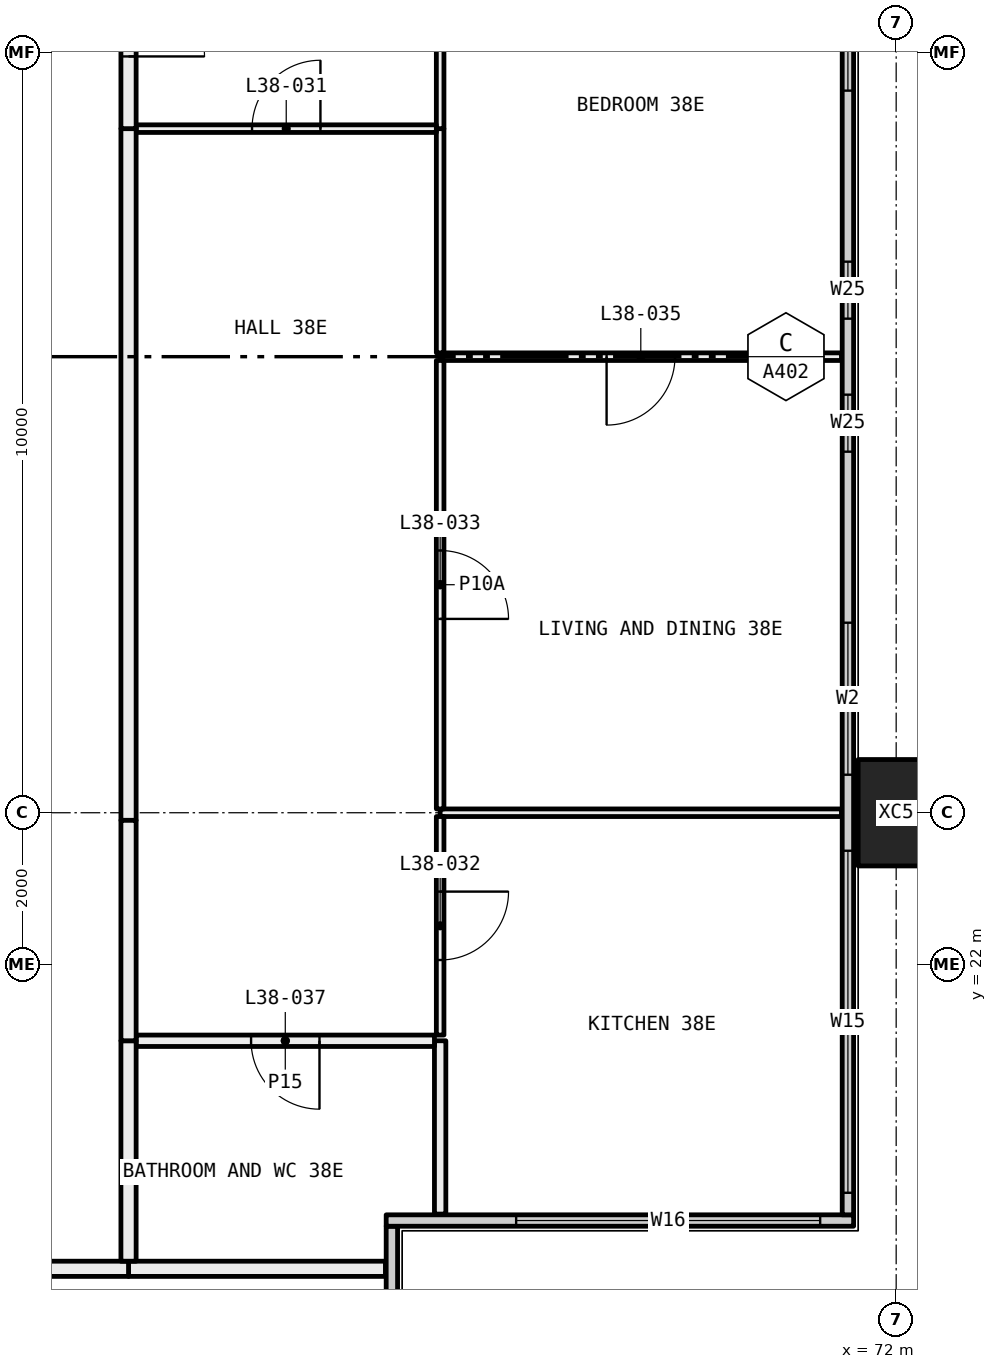
"""IFC4 building model, lengths in metres.
Left out: names, types, materials, properties, quantities, classifications, styles, units other than length and angle.
Written with IfcOpenShell. Run it as: python <this file> out.ifc"""

import sys

from ifc_helpers import new_model, si_unit, direction, frame, frame_2d, origin, origin_2d, place, context, subcontext, project, spatial, rectangle, hollow_rectangle, extrude, element, fill, save


model = new_model("IFC4")
c1 = context("Model", 3, precision=1e-05, world=origin(), true_north=direction((0.0, 1.0)))
c2 = subcontext(c1, "Body", "Model", "MODEL_VIEW")
j1 = project(units=[si_unit("LENGTHUNIT", "METRE"), si_unit("PLANEANGLEUNIT", "RADIAN")], contexts=[c1])
p1 = place(None, origin())
s1 = spatial("IfcSite", under=j1, at=p1, CompositionType="ELEMENT")
p2 = place(p1, origin())
s2 = spatial("IfcBuilding", under=s1, at=p2, CompositionType="ELEMENT")
p3 = place(p2, frame((0.0, 0.0, 144.9)))
s3 = spatial("IfcBuildingStorey", under=s2, at=p3, CompositionType="ELEMENT", Elevation=144.9)
p4 = place(p3, frame((72.0, 24.0, -0.4), z_axis=(0.0, 0.0, 1.0), x_axis=(0.0, 1.0, 0.0)))
e1 = element("IfcColumn", 1, at=p4, inside=s3, PredefinedType="COLUMN", context=c2, shape_type="SweptSolid", body=[
    extrude(hollow_rectangle(XDim=1.4, YDim=1.0, WallThickness=0.055, at=origin_2d()), origin(), (0.0, 0.0, 1.0), 3.45),
])
p5 = place(p3, frame((65.365, 12.71, 0.0), z_axis=(0.0, 0.0, 1.0), x_axis=(0.0, 1.0, 0.0)))
e2 = element("IfcWall", 2, at=p5, inside=s3, PredefinedType="ELEMENTEDWALL", context=c2, shape_type="SweptSolid", body=[
    extrude(rectangle(XDim=5.85, YDim=0.15, at=frame_2d((2.925, 0.0))), origin(), (0.0, 0.0, 1.0), 3.05),
])
p6 = place(p5, frame((0.29, 0.0, 0.45)))
e3 = element("IfcOpeningElement", 3, at=p6, cuts=e2, PredefinedType="OPENING", context=c2, shape_type="SweptSolid", body=[
    extrude(rectangle(XDim=4.0, YDim=2.55, at=frame_2d((2.0, 1.275))), frame((0.0, 0.085, 0.0), z_axis=(0.0, -1.0, 0.0), x_axis=(1.0, 0.0, 0.0)), (0.0, 0.0, 1.0), 0.17),
])
p7 = place(p3, frame((65.29, 18.635, 0.0), z_axis=(0.0, 0.0, 1.0), x_axis=(1.0, 0.0, 0.0)))
e4 = element("IfcWall", 4, at=p7, inside=s3, PredefinedType="ELEMENTEDWALL", context=c2, shape_type="SweptSolid", body=[
    extrude(rectangle(XDim=6.15, YDim=0.15, at=frame_2d((3.075, 0.0))), origin(), (0.0, 0.0, 1.0), 3.05),
])
p8 = place(p7, frame((1.71, 0.0, 0.45)))
e5 = element("IfcOpeningElement", 5, at=p8, cuts=e4, PredefinedType="OPENING", context=c2, shape_type="SweptSolid", body=[
    extrude(rectangle(XDim=4.0, YDim=2.55, at=frame_2d((2.0, 1.275))), frame((0.0, 0.085, 0.0), z_axis=(0.0, -1.0, 0.0), x_axis=(1.0, 0.0, 0.0)), (0.0, 0.0, 1.0), 0.17),
])
p9 = place(p3, frame((71.365, 18.71, 0.0), z_axis=(0.0, 0.0, 1.0), x_axis=(0.0, 1.0, 0.0)))
e6 = element("IfcWall", 6, at=p9, inside=s3, PredefinedType="ELEMENTEDWALL", context=c2, shape_type="SweptSolid", body=[
    extrude(rectangle(XDim=22.58, YDim=0.15, at=frame_2d((11.29, 0.0))), origin(), (0.0, 0.0, 1.0), 3.05),
])
p10 = place(p9, frame((0.29, 0.0, 0.45)))
e7 = element("IfcOpeningElement", 7, at=p10, cuts=e6, PredefinedType="OPENING", context=c2, shape_type="SweptSolid", body=[
    extrude(rectangle(XDim=4.5, YDim=2.55, at=frame_2d((2.25, 1.275))), frame((0.0, 0.085, 0.0), z_axis=(0.0, -1.0, 0.0), x_axis=(1.0, 0.0, 0.0)), (0.0, 0.0, 1.0), 0.17),
])
p11 = place(p9, frame((5.79, 0.0, 0.45)))
e8 = element("IfcOpeningElement", 8, at=p11, cuts=e6, PredefinedType="OPENING", context=c2, shape_type="SweptSolid", body=[
    extrude(rectangle(XDim=2.0, YDim=2.55, at=frame_2d((1.0, 1.275))), frame((0.0, 0.085, 0.0), z_axis=(0.0, -1.0, 0.0), x_axis=(1.0, 0.0, 0.0)), (0.0, 0.0, 1.0), 0.17),
])
p12 = place(p9, frame((10.04, 0.0, 0.45)))
e9 = element("IfcOpeningElement", 9, at=p12, cuts=e6, PredefinedType="OPENING", context=c2, shape_type="SweptSolid", body=[
    extrude(rectangle(XDim=0.75, YDim=2.55, at=frame_2d((0.375, 1.275))), frame((0.0, 0.085, 0.0), z_axis=(0.0, -1.0, 0.0), x_axis=(1.0, 0.0, 0.0)), (0.0, 0.0, 1.0), 0.17),
])
p13 = place(p9, frame((11.79, 0.0, 0.45)))
e10 = element("IfcOpeningElement", 10, at=p13, cuts=e6, PredefinedType="OPENING", context=c2, shape_type="SweptSolid", body=[
    extrude(rectangle(XDim=0.75, YDim=2.55, at=frame_2d((0.375, 1.275))), frame((0.0, 0.085, 0.0), z_axis=(0.0, -1.0, 0.0), x_axis=(1.0, 0.0, 0.0)), (0.0, 0.0, 1.0), 0.17),
])
p14 = place(p9, frame((14.79, 0.0, 0.45)))
e11 = element("IfcOpeningElement", 11, at=p14, cuts=e6, PredefinedType="OPENING", context=c2, shape_type="SweptSolid", body=[
    extrude(rectangle(XDim=2.0, YDim=2.55, at=frame_2d((1.0, 1.275))), frame((0.0, 0.085, 0.0), z_axis=(0.0, -1.0, 0.0), x_axis=(1.0, 0.0, 0.0)), (0.0, 0.0, 1.0), 0.17),
])
p15 = place(p9, frame((17.79, 0.0, 0.45)))
e12 = element("IfcOpeningElement", 12, at=p15, cuts=e6, PredefinedType="OPENING", context=c2, shape_type="SweptSolid", body=[
    extrude(rectangle(XDim=4.5, YDim=2.55, at=frame_2d((2.25, 1.275))), frame((0.0, 0.085, 0.0), z_axis=(0.0, -1.0, 0.0), x_axis=(1.0, 0.0, 0.0)), (0.0, 0.0, 1.0), 0.17),
])
p16 = place(p3, frame((65.28, 18.0, 0.0), z_axis=(0.0, 0.0, 1.0), x_axis=(-1.0, 0.0, 0.0)))
e13 = element("IfcWall", 13, at=p16, inside=s3, PredefinedType="PARTITIONING", context=c2, shape_type="SweptSolid", body=[
    extrude(rectangle(XDim=3.38, YDim=0.2, at=frame_2d((1.69, 0.0))), origin(), (0.0, 0.0, 1.0), 3.05),
])
p17 = place(p3, frame((61.9, 18.0, 0.0), z_axis=(0.0, 0.0, 1.0), x_axis=(-1.0, 0.0, 0.0)))
e14 = element("IfcWall", 14, at=p17, inside=s3, PredefinedType="PARTITIONING", context=c2, shape_type="SweptSolid", body=[
    extrude(rectangle(XDim=1.9, YDim=0.2, at=frame_2d((0.95, 0.0))), origin(), (0.0, 0.0, 1.0), 3.05),
])
p18 = place(p3, frame((71.28, 24.0, 0.0), z_axis=(0.0, 0.0, 1.0), x_axis=(-1.0, 0.0, 0.0)))
e15 = element("IfcWall", 15, at=p18, inside=s3, PredefinedType="PARTITIONING", context=c2, shape_type="SweptSolid", body=[
    extrude(rectangle(XDim=5.28, YDim=0.1, at=frame_2d((2.64, 0.0))), origin(), (0.0, 0.0, 1.0), 2.45),
])
p19 = place(p3, frame((66.0, 21.0, 0.0), z_axis=(0.0, 0.0, 1.0), x_axis=(0.0, -1.0, 0.0)))
e16 = element("IfcWall", 16, at=p19, inside=s3, PredefinedType="PARTITIONING", context=c2, shape_type="SweptSolid", body=[
    extrude(rectangle(XDim=2.28, YDim=0.15, at=frame_2d((1.14, 0.0))), origin(), (0.0, 0.0, 1.0), 3.05),
])
p20 = place(p3, frame((66.0, 23.95, 0.0), z_axis=(0.0, 0.0, 1.0), x_axis=(0.0, -1.0, 0.0)))
e17 = element("IfcWall", 17, at=p20, inside=s3, PredefinedType="PARTITIONING", context=c2, shape_type="SweptSolid", body=[
    extrude(rectangle(XDim=2.875, YDim=0.1, at=frame_2d((1.438, 0.0))), origin(), (0.0, 0.0, 1.0), 2.45),
])
p21 = place(p20, frame((0.988, 0.0, 0.0)))
e18 = element("IfcOpeningElement", 18, at=p21, cuts=e17, PredefinedType="OPENING", context=c2, shape_type="SweptSolid", body=[
    extrude(rectangle(XDim=0.9, YDim=2.1, at=frame_2d((0.45, 1.05))), frame((0.0, 0.06, 0.0), z_axis=(0.0, -1.0, 0.0), x_axis=(1.0, 0.0, 0.0)), (0.0, 0.0, 1.0), 0.12),
])
p22 = place(p3, frame((71.28, 30.0, 0.0), z_axis=(0.0, 0.0, 1.0), x_axis=(-1.0, 0.0, 0.0)))
e19 = element("IfcWall", 19, at=p22, inside=s3, PredefinedType="PARTITIONING", context=c2, shape_type="SweptSolid", body=[
    extrude(rectangle(XDim=5.28, YDim=0.1, at=frame_2d((2.64, 0.0))), origin(), (0.0, 0.0, 1.0), 3.05),
])
p23 = place(p22, frame((2.19, 0.0, 0.0)))
e20 = element("IfcOpeningElement", 20, at=p23, cuts=e19, PredefinedType="OPENING", context=c2, shape_type="SweptSolid", body=[
    extrude(rectangle(XDim=0.9, YDim=2.1, at=frame_2d((0.45, 1.05))), frame((0.0, 0.06, 0.0), z_axis=(0.0, -1.0, 0.0), x_axis=(1.0, 0.0, 0.0)), (0.0, 0.0, 1.0), 0.12),
])
p24 = place(p3, frame((66.0, 29.95, 0.0), z_axis=(0.0, 0.0, 1.0), x_axis=(0.0, -1.0, 0.0)))
e21 = element("IfcWall", 21, at=p24, inside=s3, PredefinedType="PARTITIONING", context=c2, shape_type="SweptSolid", body=[
    extrude(rectangle(XDim=5.9, YDim=0.1, at=frame_2d((2.95, 0.0))), origin(), (0.0, 0.0, 1.0), 2.45),
])
p25 = place(p24, frame((2.5, 0.0, 0.0)))
e22 = element("IfcOpeningElement", 22, at=p25, cuts=e21, PredefinedType="OPENING", context=c2, shape_type="SweptSolid", body=[
    extrude(rectangle(XDim=0.9, YDim=2.1, at=frame_2d((0.45, 1.05))), frame((0.0, 0.06, 0.0), z_axis=(0.0, -1.0, 0.0), x_axis=(1.0, 0.0, 0.0)), (0.0, 0.0, 1.0), 0.12),
])
p26 = place(p3, frame((66.0, 33.0, 0.0), z_axis=(0.0, 0.0, 1.0), x_axis=(0.0, -1.0, 0.0)))
e23 = element("IfcWall", 23, at=p26, inside=s3, PredefinedType="PARTITIONING", context=c2, shape_type="SweptSolid", body=[
    extrude(rectangle(XDim=2.95, YDim=0.1, at=frame_2d((1.475, 0.0))), origin(), (0.0, 0.0, 1.0), 3.05),
])
p27 = place(p3, frame((66.0, 35.95, 0.0), z_axis=(0.0, 0.0, 1.0), x_axis=(0.0, -1.0, 0.0)))
e24 = element("IfcWall", 24, at=p27, inside=s3, PredefinedType="PARTITIONING", context=c2, shape_type="SweptSolid", body=[
    extrude(rectangle(XDim=2.95, YDim=0.1, at=frame_2d((1.475, 0.0))), origin(), (0.0, 0.0, 1.0), 2.45),
])
p28 = place(p3, frame((65.925, 21.0, 0.0), z_axis=(0.0, 0.0, 1.0), x_axis=(-1.0, 0.0, 0.0)))
e25 = element("IfcWall", 25, at=p28, inside=s3, PredefinedType="PARTITIONING", context=c2, shape_type="SweptSolid", body=[
    extrude(rectangle(XDim=3.925, YDim=0.15, at=frame_2d((1.962, 0.0))), origin(), (0.0, 0.0, 1.0), 3.05),
])
p29 = place(p28, frame((1.512, 0.0, 0.0)))
e26 = element("IfcOpeningElement", 26, at=p29, cuts=e25, PredefinedType="OPENING", context=c2, shape_type="SweptSolid", body=[
    extrude(rectangle(XDim=0.9, YDim=2.1, at=frame_2d((0.45, 1.05))), frame((0.0, 0.085, 0.0), z_axis=(0.0, -1.0, 0.0), x_axis=(1.0, 0.0, 0.0)), (0.0, 0.0, 1.0), 0.17),
])
p30 = place(p3, frame((61.9, 21.0, 0.0), z_axis=(0.0, 0.0, 1.0), x_axis=(0.0, -1.0, 0.0)))
e27 = element("IfcWall", 27, at=p30, inside=s3, PredefinedType="PARTITIONING", context=c2, shape_type="SweptSolid", body=[
    extrude(rectangle(XDim=2.9, YDim=0.2, at=frame_2d((1.45, 0.0))), origin(), (0.0, 0.0, 1.0), 3.05),
])
p31 = place(p3, frame((65.95, 33.0, 0.0), z_axis=(0.0, 0.0, 1.0), x_axis=(-1.0, 0.0, 0.0)))
e28 = element("IfcWall", 28, at=p31, inside=s3, PredefinedType="PARTITIONING", context=c2, shape_type="SweptSolid", body=[
    extrude(rectangle(XDim=3.95, YDim=0.1, at=frame_2d((1.975, 0.0))), origin(), (0.0, 0.0, 1.0), 3.05),
])
p32 = place(p31, frame((1.525, 0.0, 0.0)))
e29 = element("IfcOpeningElement", 29, at=p32, cuts=e28, PredefinedType="OPENING", context=c2, shape_type="SweptSolid", body=[
    extrude(rectangle(XDim=0.9, YDim=2.1, at=frame_2d((0.45, 1.05))), frame((0.0, 0.06, 0.0), z_axis=(0.0, -1.0, 0.0), x_axis=(1.0, 0.0, 0.0)), (0.0, 0.0, 1.0), 0.12),
])
p33 = place(p3, frame((61.9, 33.0, 0.0), z_axis=(0.0, 0.0, 1.0), x_axis=(0.0, -1.0, 0.0)))
e30 = element("IfcWall", 30, at=p33, inside=s3, PredefinedType="PARTITIONING", context=c2, shape_type="SweptSolid", body=[
    extrude(rectangle(XDim=9.1, YDim=0.2, at=frame_2d((4.55, 0.0))), origin(), (0.0, 0.0, 1.0), 2.45),
])
p34 = place(p3, frame((61.9, 23.9, 0.0), z_axis=(0.0, 0.0, 1.0), x_axis=(0.0, -1.0, 0.0)))
e31 = element("IfcWall", 31, at=p34, inside=s3, PredefinedType="PARTITIONING", context=c2, shape_type="SweptSolid", body=[
    extrude(rectangle(XDim=2.9, YDim=0.2, at=frame_2d((1.45, 0.0))), origin(), (0.0, 0.0, 1.0), 3.05),
])
p35 = place(p3, frame((61.9, 35.9, 0.0), z_axis=(0.0, 0.0, 1.0), x_axis=(0.0, -1.0, 0.0)))
e32 = element("IfcWall", 32, at=p35, inside=s3, PredefinedType="PARTITIONING", context=c2, shape_type="SweptSolid", body=[
    extrude(rectangle(XDim=2.9, YDim=0.2, at=frame_2d((1.45, 0.0))), origin(), (0.0, 0.0, 1.0), 3.05),
])
p36 = place(p35, frame((0.95, 0.0, 0.0)))
e33 = element("IfcOpeningElement", 33, at=p36, cuts=e32, PredefinedType="OPENING", context=c2, shape_type="SweptSolid", body=[
    extrude(rectangle(XDim=1.0, YDim=2.1, at=frame_2d((0.5, 1.05))), frame((0.0, 0.11, 0.0), z_axis=(0.0, -1.0, 0.0), x_axis=(1.0, 0.0, 0.0)), (0.0, 0.0, 1.0), 0.22),
])
p37 = place(p8, origin())
e34 = element("IfcWindow", 34, at=p37, inside=s3, PartitioningType="SINGLE_PANEL", PredefinedType="WINDOW", context=c2, shape_type="SweptSolid", body=[
    extrude(rectangle(XDim=4.0, YDim=2.55, at=frame_2d((2.0, 1.275))), frame((0.0, 0.03, 0.0), z_axis=(0.0, -1.0, 0.0), x_axis=(1.0, 0.0, 0.0)), (0.0, 0.0, 1.0), 0.06),
])
fill(e5, e34)
p38 = place(p10, origin())
e35 = element("IfcWindow", 35, at=p38, inside=s3, PartitioningType="SINGLE_PANEL", PredefinedType="WINDOW", context=c2, shape_type="SweptSolid", body=[
    extrude(rectangle(XDim=4.5, YDim=2.55, at=frame_2d((2.25, 1.275))), frame((0.0, 0.03, 0.0), z_axis=(0.0, -1.0, 0.0), x_axis=(1.0, 0.0, 0.0)), (0.0, 0.0, 1.0), 0.06),
])
fill(e7, e35)
p39 = place(p11, origin())
e36 = element("IfcWindow", 36, at=p39, inside=s3, PartitioningType="SINGLE_PANEL", PredefinedType="WINDOW", context=c2, shape_type="SweptSolid", body=[
    extrude(rectangle(XDim=2.0, YDim=2.55, at=frame_2d((1.0, 1.275))), frame((0.0, 0.03, 0.0), z_axis=(0.0, -1.0, 0.0), x_axis=(1.0, 0.0, 0.0)), (0.0, 0.0, 1.0), 0.06),
])
fill(e8, e36)
p40 = place(p12, origin())
e37 = element("IfcWindow", 37, at=p40, inside=s3, PartitioningType="SINGLE_PANEL", PredefinedType="WINDOW", context=c2, shape_type="SweptSolid", body=[
    extrude(rectangle(XDim=0.75, YDim=2.55, at=frame_2d((0.375, 1.275))), frame((0.0, 0.03, 0.0), z_axis=(0.0, -1.0, 0.0), x_axis=(1.0, 0.0, 0.0)), (0.0, 0.0, 1.0), 0.06),
])
fill(e9, e37)
p41 = place(p13, origin())
e38 = element("IfcWindow", 38, at=p41, inside=s3, PartitioningType="SINGLE_PANEL", PredefinedType="WINDOW", context=c2, shape_type="SweptSolid", body=[
    extrude(rectangle(XDim=0.75, YDim=2.55, at=frame_2d((0.375, 1.275))), frame((0.0, 0.03, 0.0), z_axis=(0.0, -1.0, 0.0), x_axis=(1.0, 0.0, 0.0)), (0.0, 0.0, 1.0), 0.06),
])
fill(e10, e38)
p42 = place(p14, origin())
e39 = element("IfcWindow", 39, at=p42, inside=s3, PartitioningType="SINGLE_PANEL", PredefinedType="WINDOW", context=c2, shape_type="SweptSolid", body=[
    extrude(rectangle(XDim=2.0, YDim=2.55, at=frame_2d((1.0, 1.275))), frame((0.0, 0.03, 0.0), z_axis=(0.0, -1.0, 0.0), x_axis=(1.0, 0.0, 0.0)), (0.0, 0.0, 1.0), 0.06),
])
fill(e11, e39)
p43 = place(p36, origin())
e40 = element("IfcDoor", 40, at=p43, inside=s3, OperationType="SINGLE_SWING_LEFT", PredefinedType="DOOR", context=c2, shape_type="SweptSolid", body=[
    extrude(rectangle(XDim=1.0, YDim=2.1, at=frame_2d((0.5, 1.05))), frame((0.0, 0.025, 0.0), z_axis=(0.0, -1.0, 0.0), x_axis=(1.0, 0.0, 0.0)), (0.0, 0.0, 1.0), 0.05),
])
fill(e33, e40)
p44 = place(p32, frame((0.9, 0.0, 0.0), x_axis=(-1.0, 0.0, 0.0)))
e41 = element("IfcDoor", 41, at=p44, inside=s3, OperationType="SINGLE_SWING_LEFT", PredefinedType="DOOR", context=c2, shape_type="SweptSolid", body=[
    extrude(rectangle(XDim=0.9, YDim=2.1, at=frame_2d((0.45, 1.05))), frame((0.0, 0.025, 0.0), z_axis=(0.0, -1.0, 0.0), x_axis=(1.0, 0.0, 0.0)), (0.0, 0.0, 1.0), 0.05),
])
fill(e29, e41)
p45 = place(p21, origin())
e42 = element("IfcDoor", 42, at=p45, inside=s3, OperationType="SINGLE_SWING_RIGHT", PredefinedType="DOOR", context=c2, shape_type="SweptSolid", body=[
    extrude(rectangle(XDim=0.9, YDim=2.1, at=frame_2d((0.45, 1.05))), frame((0.0, 0.025, 0.0), z_axis=(0.0, -1.0, 0.0), x_axis=(1.0, 0.0, 0.0)), (0.0, 0.0, 1.0), 0.05),
])
fill(e18, e42)
p46 = place(p25, origin())
e43 = element("IfcDoor", 43, at=p46, inside=s3, OperationType="SINGLE_SWING_LEFT", PredefinedType="DOOR", context=c2, shape_type="SweptSolid", body=[
    extrude(rectangle(XDim=0.9, YDim=2.1, at=frame_2d((0.45, 1.05))), frame((0.0, 0.025, 0.0), z_axis=(0.0, -1.0, 0.0), x_axis=(1.0, 0.0, 0.0)), (0.0, 0.0, 1.0), 0.05),
])
fill(e22, e43)
p47 = place(p23, origin())
e44 = element("IfcDoor", 44, at=p47, inside=s3, OperationType="SINGLE_SWING_LEFT", PredefinedType="DOOR", context=c2, shape_type="SweptSolid", body=[
    extrude(rectangle(XDim=0.9, YDim=2.1, at=frame_2d((0.45, 1.05))), frame((0.0, 0.025, 0.0), z_axis=(0.0, -1.0, 0.0), x_axis=(1.0, 0.0, 0.0)), (0.0, 0.0, 1.0), 0.05),
])
fill(e20, e44)
p48 = place(p29, origin())
e45 = element("IfcDoor", 45, at=p48, inside=s3, OperationType="SINGLE_SWING_RIGHT", PredefinedType="DOOR", context=c2, shape_type="SweptSolid", body=[
    extrude(rectangle(XDim=0.9, YDim=2.1, at=frame_2d((0.45, 1.05))), frame((0.0, 0.025, 0.0), z_axis=(0.0, -1.0, 0.0), x_axis=(1.0, 0.0, 0.0)), (0.0, 0.0, 1.0), 0.05),
])
fill(e26, e45)
save(model, sys.argv[1])
